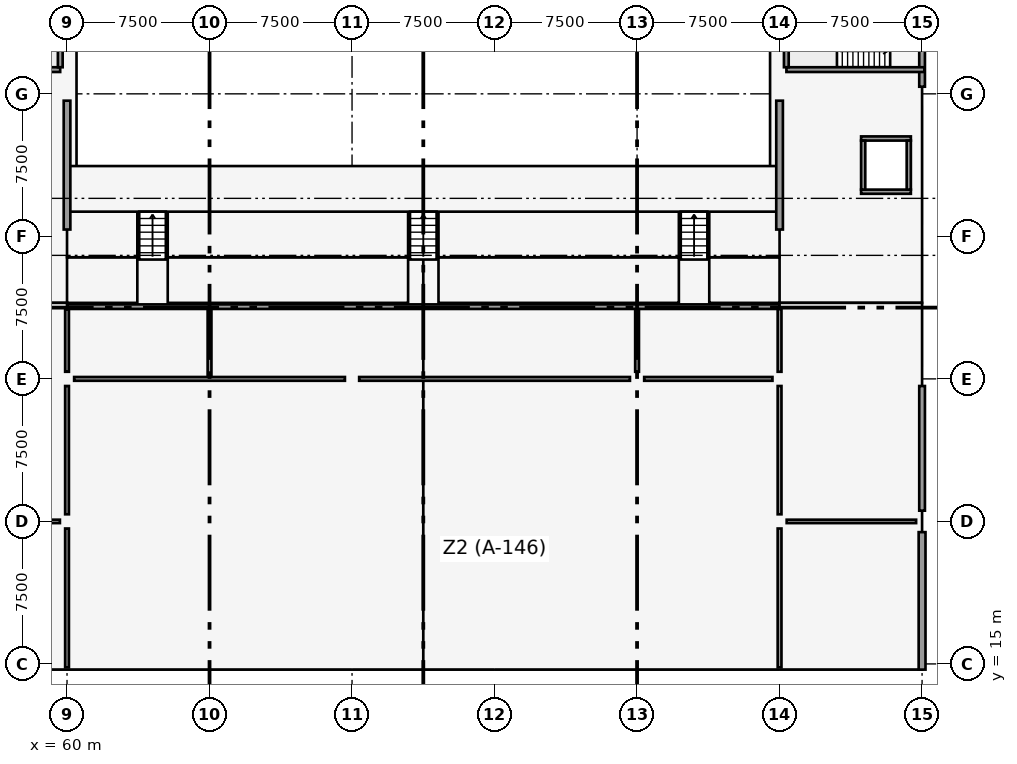
"""IFC4 building model, lengths in metres.
Left out: names, types, materials, properties, quantities, classifications, styles, units other than length and angle.
Written with IfcOpenShell. Run it as: python <this file> out.ifc"""

import sys

from ifc_helpers import new_model, si_unit, direction, frame, frame_2d, origin, origin_2d, place, context, subcontext, project, spatial, rectangle, extrude, element, fill, save


model = new_model("IFC4")
c1 = context("Model", 3, precision=1e-05, world=origin(), true_north=direction((0.0, 1.0)))
c2 = subcontext(c1, "Body", "Model", "MODEL_VIEW")
j1 = project(units=[si_unit("LENGTHUNIT", "METRE"), si_unit("PLANEANGLEUNIT", "RADIAN")], contexts=[c1])
p1 = place(None, origin())
s1 = spatial("IfcSite", under=j1, at=p1, CompositionType="ELEMENT")
p2 = place(p1, origin())
s2 = spatial("IfcBuilding", under=s1, at=p2, CompositionType="ELEMENT")
p3 = place(p2, frame((0.0, 0.0, 13.2)))
s3 = spatial("IfcBuildingStorey", under=s2, at=p3, CompositionType="ELEMENT", Elevation=13.2)
for number, where, z_axis, x_axis in (
    (1, (60.0, 22.5, 0.0), (0.0, 0.0, 1.0), (1.0, 0.0, 0.0)),
    (2, (60.0, 30.0, 0.0), (0.0, 0.0, 1.0), (1.0, 0.0, 0.0)),
    (3, (60.0, 37.5, 0.0), (0.0, 0.0, 1.0), (1.0, 0.0, 0.0)),
    (4, (60.0, 45.0, 0.0), (0.0, 0.0, 1.0), (1.0, 0.0, 0.0)),
    (5, (75.0, 22.5, 0.0), (0.0, 0.0, 1.0), (1.0, 0.0, 0.0)),
    (6, (75.0, 30.0, 0.0), (0.0, 0.0, 1.0), (1.0, 0.0, 0.0)),
    (7, (90.0, 22.5, 0.0), (0.0, 0.0, 1.0), (1.0, 0.0, 0.0)),
    (8, (90.0, 30.0, 0.0), (0.0, 0.0, 1.0), (1.0, 0.0, 0.0)),
    (9, (97.5, 22.5, 0.0), (0.0, 0.0, 1.0), (1.0, 0.0, 0.0)),
    (10, (97.5, 30.0, 0.0), (0.0, 0.0, 1.0), (1.0, 0.0, 0.0)),
    (11, (97.5, 37.5, 0.0), (0.0, 0.0, 1.0), (1.0, 0.0, 0.0)),
    (12, (97.5, 45.0, 0.0), (0.0, 0.0, 1.0), (1.0, 0.0, 0.0)),
):
    element("IfcColumn", number, at=place(p3, frame(where, z_axis=z_axis, x_axis=x_axis)), inside=s3, PredefinedType="COLUMN", context=c2, shape_type="SweptSolid", body=[
        extrude(rectangle(XDim=0.72, YDim=0.72, at=origin_2d()), origin(), (0.0, 0.0, 1.0), 3.9),
    ])
p4 = place(p3, frame((105.0, 22.5, 0.0), z_axis=(0.0, 0.0, 1.0), x_axis=(1.0, 0.0, 0.0)))
e13 = element("IfcColumn", 13, at=p4, inside=s3, PredefinedType="COLUMN", context=c2, shape_type="SweptSolid", body=[
    extrude(rectangle(XDim=0.6, YDim=1.1, at=origin_2d()), origin(), (0.0, 0.0, 1.0), 3.9),
])
for number, where, z_axis, x_axis in (
    (14, (105.0, 30.0, 0.0), (0.0, 0.0, 1.0), (1.0, 0.0, 0.0)),
    (15, (105.0, 37.5, 0.0), (0.0, 0.0, 1.0), (1.0, 0.0, 0.0)),
    (16, (105.0, 45.0, 0.0), (0.0, 0.0, 1.0), (1.0, 0.0, 0.0)),
):
    element("IfcColumn", number, at=place(p3, frame(where, z_axis=z_axis, x_axis=x_axis)), inside=s3, PredefinedType="COLUMN", context=c2, shape_type="SweptSolid", body=[
        extrude(rectangle(XDim=0.72, YDim=0.72, at=origin_2d()), origin(), (0.0, 0.0, 1.0), 3.9),
    ])
for number, where, z_axis, x_axis in (
    (17, (60.0, 37.86, 0.0), (0.0, 0.0, 1.0), (0.0, 1.0, 0.0)),
    (18, (97.5, 37.86, 0.0), (0.0, 0.0, 1.0), (0.0, 1.0, 0.0)),
):
    element("IfcWall", number, at=place(p3, frame(where, z_axis=z_axis, x_axis=x_axis)), inside=s3, PredefinedType="SHEAR", context=c2, shape_type="SweptSolid", body=[
        extrude(rectangle(XDim=6.78, YDim=0.35, at=frame_2d((3.39, 0.0))), origin(), (0.0, 0.0, 1.0), 2.42),
    ])
p5 = place(p3, frame((105.0, 14.7, 0.0), z_axis=(0.0, 0.0, 1.0), x_axis=(0.0, 1.0, 0.0)))
e19 = element("IfcWall", 19, at=p5, inside=s3, PredefinedType="SOLIDWALL", context=c2, shape_type="SweptSolid", body=[
    extrude(rectangle(XDim=7.235, YDim=0.36, at=frame_2d((3.618, 0.0))), origin(), (0.0, 0.0, 1.0), 2.39),
])
p6 = place(p3, frame((105.0, 23.065, 0.0), z_axis=(0.0, 0.0, 1.0), x_axis=(0.0, 1.0, 0.0)))
e20 = element("IfcWall", 20, at=p6, inside=s3, PredefinedType="SOLIDWALL", context=c2, shape_type="SweptSolid", body=[
    extrude(rectangle(XDim=6.56, YDim=0.3, at=frame_2d((3.28, 0.0))), origin(), (0.0, 0.0, 1.0), 2.39),
])
p7 = place(p3, frame((105.0, 45.375, 0.0), z_axis=(0.0, 0.0, 1.0), x_axis=(0.0, 1.0, 0.0)))
e21 = element("IfcWall", 21, at=p7, inside=s3, PredefinedType="SOLIDWALL", context=c2, shape_type="SweptSolid", body=[
    extrude(rectangle(XDim=6.75, YDim=0.3, at=frame_2d((3.375, 0.0))), origin(), (0.0, 0.0, 1.0), 2.54),
])
p8 = place(p3, frame((52.38, 46.275, 0.0), z_axis=(0.0, 0.0, 1.0), x_axis=(1.0, 0.0, 0.0)))
e22 = element("IfcWall", 22, at=p8, inside=s3, PredefinedType="SOLIDWALL", context=c2, shape_type="SweptSolid", body=[
    extrude(rectangle(XDim=7.26, YDim=0.25, at=frame_2d((3.63, 0.0))), origin(), (0.0, 0.0, 1.0), 3.62),
])
p9 = place(p8, frame((0.62, 0.0, 0.0)))
e23 = element("IfcOpeningElement", 23, at=p9, cuts=e22, PredefinedType="OPENING", context=c2, shape_type="SweptSolid", body=[
    extrude(rectangle(XDim=1.1, YDim=2.15, at=frame_2d((0.55, 1.075))), frame((0.0, 0.135, 0.0), z_axis=(0.0, -1.0, 0.0), x_axis=(1.0, 0.0, 0.0)), (0.0, 0.0, 1.0), 0.27),
])
p10 = place(p3, frame((59.645, 46.4, 0.0), z_axis=(0.0, 0.0, 1.0), x_axis=(0.0, 1.0, 0.0)))
e24 = element("IfcWall", 24, at=p10, inside=s3, PredefinedType="SOLIDWALL", context=c2, shape_type="SweptSolid", body=[
    extrude(rectangle(XDim=3.56, YDim=0.25, at=frame_2d((1.78, 0.0))), origin(), (0.0, 0.0, 1.0), 3.62),
])
p11 = place(p3, frame((97.86, 46.275, 0.0), z_axis=(0.0, 0.0, 1.0), x_axis=(1.0, 0.0, 0.0)))
e25 = element("IfcWall", 25, at=p11, inside=s3, PredefinedType="SOLIDWALL", context=c2, shape_type="SweptSolid", body=[
    extrude(rectangle(XDim=7.26, YDim=0.25, at=frame_2d((3.63, 0.0))), origin(), (0.0, 0.0, 1.0), 3.62),
])
p12 = place(p11, frame((5.54, 0.0, 0.0)))
e26 = element("IfcOpeningElement", 26, at=p12, cuts=e25, PredefinedType="OPENING", context=c2, shape_type="SweptSolid", body=[
    extrude(rectangle(XDim=1.1, YDim=2.15, at=frame_2d((0.55, 1.075))), frame((0.0, 0.135, 0.0), z_axis=(0.0, -1.0, 0.0), x_axis=(1.0, 0.0, 0.0)), (0.0, 0.0, 1.0), 0.27),
])
p13 = place(p3, frame((97.855, 46.4, 0.0), z_axis=(0.0, 0.0, 1.0), x_axis=(0.0, 1.0, 0.0)))
e27 = element("IfcWall", 27, at=p13, inside=s3, PredefinedType="SOLIDWALL", context=c2, shape_type="SweptSolid", body=[
    extrude(rectangle(XDim=3.56, YDim=0.25, at=frame_2d((1.78, 0.0))), origin(), (0.0, 0.0, 1.0), 3.62),
])
for number, where, z_axis, x_axis in (
    (28, (101.79, 39.85, 0.0), (0.0, 0.0, 1.0), (1.0, 0.0, 0.0)),
    (29, (101.79, 42.65, 0.0), (0.0, 0.0, 1.0), (1.0, 0.0, 0.0)),
):
    element("IfcWall", number, at=place(p3, frame(where, z_axis=z_axis, x_axis=x_axis)), inside=s3, PredefinedType="SOLIDWALL", context=c2, shape_type="SweptSolid", body=[
        extrude(rectangle(XDim=2.62, YDim=0.22, at=frame_2d((1.31, 0.0))), origin(), (0.0, 0.0, 1.0), 3.62),
    ])
p14 = place(p3, frame((101.9, 39.96, 0.0), z_axis=(0.0, 0.0, 1.0), x_axis=(0.0, 1.0, 0.0)))
e30 = element("IfcWall", 30, at=p14, inside=s3, PredefinedType="SOLIDWALL", context=c2, shape_type="SweptSolid", body=[
    extrude(rectangle(XDim=2.58, YDim=0.22, at=frame_2d((1.29, 0.0))), origin(), (0.0, 0.0, 1.0), 3.62),
])
p15 = place(p14, frame((0.79, 0.0, 0.0)))
e31 = element("IfcOpeningElement", 31, at=p15, cuts=e30, PredefinedType="OPENING", context=c2, shape_type="SweptSolid", body=[
    extrude(rectangle(XDim=1.0, YDim=2.15, at=frame_2d((0.5, 1.075))), frame((0.0, 0.12, 0.0), z_axis=(0.0, -1.0, 0.0), x_axis=(1.0, 0.0, 0.0)), (0.0, 0.0, 1.0), 0.24),
])
p16 = place(p3, frame((104.3, 39.96, 0.0), z_axis=(0.0, 0.0, 1.0), x_axis=(0.0, 1.0, 0.0)))
e32 = element("IfcWall", 32, at=p16, inside=s3, PredefinedType="SOLIDWALL", context=c2, shape_type="SweptSolid", body=[
    extrude(rectangle(XDim=2.58, YDim=0.22, at=frame_2d((1.29, 0.0))), origin(), (0.0, 0.0, 1.0), 3.62),
])
p17 = place(p3, frame((52.814, 22.5, 0.0), z_axis=(0.0, 0.0, 1.0), x_axis=(1.0, 0.0, 0.0)))
e33 = element("IfcWall", 33, at=p17, inside=s3, PredefinedType="PARTITIONING", context=c2, shape_type="SweptSolid", body=[
    extrude(rectangle(XDim=6.812, YDim=0.18, at=frame_2d((3.406, 0.0))), origin(), (0.0, 0.0, 1.0), 2.39),
])
p18 = place(p17, frame((2.786, 0.0, 0.0)))
e34 = element("IfcOpeningElement", 34, at=p18, cuts=e33, PredefinedType="OPENING", context=c2, shape_type="SweptSolid", body=[
    extrude(rectangle(XDim=1.3, YDim=2.15, at=frame_2d((0.65, 1.075))), frame((0.0, 0.1, 0.0), z_axis=(0.0, -1.0, 0.0), x_axis=(1.0, 0.0, 0.0)), (0.0, 0.0, 1.0), 0.2),
])
p19 = place(p3, frame((97.874, 22.5, 0.0), z_axis=(0.0, 0.0, 1.0), x_axis=(1.0, 0.0, 0.0)))
e35 = element("IfcWall", 35, at=p19, inside=s3, PredefinedType="PARTITIONING", context=c2, shape_type="SweptSolid", body=[
    extrude(rectangle(XDim=6.812, YDim=0.18, at=frame_2d((3.406, 0.0))), origin(), (0.0, 0.0, 1.0), 2.39),
])
p20 = place(p19, frame((2.726, 0.0, 0.0)))
e36 = element("IfcOpeningElement", 36, at=p20, cuts=e35, PredefinedType="OPENING", context=c2, shape_type="SweptSolid", body=[
    extrude(rectangle(XDim=1.3, YDim=2.15, at=frame_2d((0.65, 1.075))), frame((0.0, 0.1, 0.0), z_axis=(0.0, -1.0, 0.0), x_axis=(1.0, 0.0, 0.0)), (0.0, 0.0, 1.0), 0.2),
])
p21 = place(p3, frame((60.374, 30.0, 0.0), z_axis=(0.0, 0.0, 1.0), x_axis=(1.0, 0.0, 0.0)))
e37 = element("IfcWall", 37, at=p21, inside=s3, PredefinedType="PARTITIONING", context=c2, shape_type="SweptSolid", body=[
    extrude(rectangle(XDim=14.252, YDim=0.2, at=frame_2d((7.126, 0.0))), origin(), (0.0, 0.0, 1.0), 2.39),
])
p22 = place(p21, frame((2.626, 0.0, 0.0)))
e38 = element("IfcOpeningElement", 38, at=p22, cuts=e37, PredefinedType="OPENING", context=c2, shape_type="SweptSolid", body=[
    extrude(rectangle(XDim=1.5, YDim=2.16, at=frame_2d((0.75, 1.08))), frame((0.0, 0.11, 0.0), z_axis=(0.0, -1.0, 0.0), x_axis=(1.0, 0.0, 0.0)), (0.0, 0.0, 1.0), 0.22),
])
p23 = place(p3, frame((75.374, 30.0, 0.0), z_axis=(0.0, 0.0, 1.0), x_axis=(1.0, 0.0, 0.0)))
e39 = element("IfcWall", 39, at=p23, inside=s3, PredefinedType="PARTITIONING", context=c2, shape_type="SweptSolid", body=[
    extrude(rectangle(XDim=14.252, YDim=0.2, at=frame_2d((7.126, 0.0))), origin(), (0.0, 0.0, 1.0), 2.59),
])
p24 = place(p3, frame((90.374, 30.0, 0.0), z_axis=(0.0, 0.0, 1.0), x_axis=(1.0, 0.0, 0.0)))
e40 = element("IfcWall", 40, at=p24, inside=s3, PredefinedType="PARTITIONING", context=c2, shape_type="SweptSolid", body=[
    extrude(rectangle(XDim=6.752, YDim=0.2, at=frame_2d((3.376, 0.0))), origin(), (0.0, 0.0, 1.0), 2.39),
])
p25 = place(p24, frame((2.626, 0.0, 0.0)))
e41 = element("IfcOpeningElement", 41, at=p25, cuts=e40, PredefinedType="OPENING", context=c2, shape_type="SweptSolid", body=[
    extrude(rectangle(XDim=1.5, YDim=2.16, at=frame_2d((0.75, 1.08))), frame((0.0, 0.11, 0.0), z_axis=(0.0, -1.0, 0.0), x_axis=(1.0, 0.0, 0.0)), (0.0, 0.0, 1.0), 0.22),
])
p26 = place(p3, frame((60.0, 33.8, 0.0), z_axis=(0.0, 0.0, 1.0), x_axis=(1.0, 0.0, 0.0)))
e42 = element("IfcWall", 42, at=p26, inside=s3, PredefinedType="PARTITIONING", context=c2, shape_type="SweptSolid", body=[
    extrude(rectangle(XDim=37.5, YDim=0.24, at=frame_2d((18.75, 0.0))), origin(), (0.0, 0.0, 1.0), 2.39),
])
p27 = place(p26, frame((2.95, 0.0, 0.0)))
e43 = element("IfcOpeningElement", 43, at=p27, cuts=e42, PredefinedType="OPENING", context=c2, shape_type="SweptSolid", body=[
    extrude(rectangle(XDim=1.6, YDim=2.16, at=frame_2d((0.8, 1.08))), frame((0.0, 0.13, 0.0), z_axis=(0.0, -1.0, 0.0), x_axis=(1.0, 0.0, 0.0)), (0.0, 0.0, 1.0), 0.26),
])
p28 = place(p26, frame((32.95, 0.0, 0.0)))
e44 = element("IfcOpeningElement", 44, at=p28, cuts=e42, PredefinedType="OPENING", context=c2, shape_type="SweptSolid", body=[
    extrude(rectangle(XDim=1.6, YDim=2.16, at=frame_2d((0.8, 1.08))), frame((0.0, 0.13, 0.0), z_axis=(0.0, -1.0, 0.0), x_axis=(1.0, 0.0, 0.0)), (0.0, 0.0, 1.0), 0.26),
])
p29 = place(p3, frame((67.5, 30.114, 0.0), z_axis=(0.0, 0.0, 1.0), x_axis=(0.0, 1.0, 0.0)))
e45 = element("IfcWall", 45, at=p29, inside=s3, PredefinedType="PARTITIONING", context=c2, shape_type="SweptSolid", body=[
    extrude(rectangle(XDim=3.552, YDim=0.2, at=frame_2d((1.776, 0.0))), origin(), (0.0, 0.0, 1.0), 2.59),
])
p30 = place(p3, frame((90.0, 30.374, 0.0), z_axis=(0.0, 0.0, 1.0), x_axis=(0.0, 1.0, 0.0)))
e46 = element("IfcWall", 46, at=p30, inside=s3, PredefinedType="PARTITIONING", context=c2, shape_type="SweptSolid", body=[
    extrude(rectangle(XDim=3.292, YDim=0.2, at=frame_2d((1.646, 0.0))), origin(), (0.0, 0.0, 1.0), 2.59),
])
p31 = place(p3, frame((60.0, 14.82, 0.0), z_axis=(0.0, 0.0, 1.0), x_axis=(0.0, 1.0, 0.0)))
e47 = element("IfcWall", 47, at=p31, inside=s3, PredefinedType="PARTITIONING", context=c2, shape_type="SweptSolid", body=[
    extrude(rectangle(XDim=7.306, YDim=0.2, at=frame_2d((3.653, 0.0))), origin(), (0.0, 0.0, 1.0), 2.39),
])
p32 = place(p3, frame((60.0, 22.874, 0.0), z_axis=(0.0, 0.0, 1.0), x_axis=(0.0, 1.0, 0.0)))
e48 = element("IfcWall", 48, at=p32, inside=s3, PredefinedType="PARTITIONING", context=c2, shape_type="SweptSolid", body=[
    extrude(rectangle(XDim=6.752, YDim=0.2, at=frame_2d((3.376, 0.0))), origin(), (0.0, 0.0, 1.0), 2.39),
])
p33 = place(p32, frame((2.576, 0.0, 0.0)))
e49 = element("IfcOpeningElement", 49, at=p33, cuts=e48, PredefinedType="OPENING", context=c2, shape_type="SweptSolid", body=[
    extrude(rectangle(XDim=1.6, YDim=2.15, at=frame_2d((0.8, 1.075))), frame((0.0, 0.11, 0.0), z_axis=(0.0, -1.0, 0.0), x_axis=(1.0, 0.0, 0.0)), (0.0, 0.0, 1.0), 0.22),
])
p34 = place(p3, frame((60.0, 30.374, 0.0), z_axis=(0.0, 0.0, 1.0), x_axis=(0.0, 1.0, 0.0)))
e50 = element("IfcWall", 50, at=p34, inside=s3, PredefinedType="PARTITIONING", context=c2, shape_type="SweptSolid", body=[
    extrude(rectangle(XDim=3.292, YDim=0.2, at=frame_2d((1.646, 0.0))), origin(), (0.0, 0.0, 1.0), 2.39),
])
p35 = place(p34, frame((0.726, 0.0, 0.0)))
e51 = element("IfcOpeningElement", 51, at=p35, cuts=e50, PredefinedType="OPENING", context=c2, shape_type="SweptSolid", body=[
    extrude(rectangle(XDim=1.6, YDim=2.16, at=frame_2d((0.8, 1.08))), frame((0.0, 0.11, 0.0), z_axis=(0.0, -1.0, 0.0), x_axis=(1.0, 0.0, 0.0)), (0.0, 0.0, 1.0), 0.22),
])
p36 = place(p3, frame((97.5, 14.82, 0.0), z_axis=(0.0, 0.0, 1.0), x_axis=(0.0, 1.0, 0.0)))
e52 = element("IfcWall", 52, at=p36, inside=s3, PredefinedType="PARTITIONING", context=c2, shape_type="SweptSolid", body=[
    extrude(rectangle(XDim=7.306, YDim=0.2, at=frame_2d((3.653, 0.0))), origin(), (0.0, 0.0, 1.0), 2.39),
])
p37 = place(p3, frame((97.5, 22.874, 0.0), z_axis=(0.0, 0.0, 1.0), x_axis=(0.0, 1.0, 0.0)))
e53 = element("IfcWall", 53, at=p37, inside=s3, PredefinedType="PARTITIONING", context=c2, shape_type="SweptSolid", body=[
    extrude(rectangle(XDim=6.752, YDim=0.2, at=frame_2d((3.376, 0.0))), origin(), (0.0, 0.0, 1.0), 2.39),
])
p38 = place(p37, frame((2.576, 0.0, 0.0)))
e54 = element("IfcOpeningElement", 54, at=p38, cuts=e53, PredefinedType="OPENING", context=c2, shape_type="SweptSolid", body=[
    extrude(rectangle(XDim=1.6, YDim=2.15, at=frame_2d((0.8, 1.075))), frame((0.0, 0.11, 0.0), z_axis=(0.0, -1.0, 0.0), x_axis=(1.0, 0.0, 0.0)), (0.0, 0.0, 1.0), 0.22),
])
p39 = place(p3, frame((97.5, 30.374, 0.0), z_axis=(0.0, 0.0, 1.0), x_axis=(0.0, 1.0, 0.0)))
e55 = element("IfcWall", 55, at=p39, inside=s3, PredefinedType="PARTITIONING", context=c2, shape_type="SweptSolid", body=[
    extrude(rectangle(XDim=3.292, YDim=0.2, at=frame_2d((1.646, 0.0))), origin(), (0.0, 0.0, 1.0), 2.39),
])
p40 = place(p39, frame((0.726, 0.0, 0.0)))
e56 = element("IfcOpeningElement", 56, at=p40, cuts=e55, PredefinedType="OPENING", context=c2, shape_type="SweptSolid", body=[
    extrude(rectangle(XDim=1.6, YDim=2.16, at=frame_2d((0.8, 1.08))), frame((0.0, 0.11, 0.0), z_axis=(0.0, -1.0, 0.0), x_axis=(1.0, 0.0, 0.0)), (0.0, 0.0, 1.0), 0.22),
])
p41 = place(p12, origin())
e57 = element("IfcDoor", 57, at=p41, inside=s3, OperationType="SINGLE_SWING_LEFT", PredefinedType="DOOR", context=c2, shape_type="SweptSolid", body=[
    extrude(rectangle(XDim=1.1, YDim=2.15, at=frame_2d((0.55, 1.075))), frame((0.0, 0.025, 0.0), z_axis=(0.0, -1.0, 0.0), x_axis=(1.0, 0.0, 0.0)), (0.0, 0.0, 1.0), 0.05),
])
fill(e26, e57)
p42 = place(p15, origin())
e58 = element("IfcDoor", 58, at=p42, inside=s3, OperationType="SLIDING_TO_LEFT", PredefinedType="DOOR", context=c2, shape_type="SweptSolid", body=[
    extrude(rectangle(XDim=1.0, YDim=2.15, at=frame_2d((0.5, 1.075))), frame((0.0, 0.025, 0.0), z_axis=(0.0, -1.0, 0.0), x_axis=(1.0, 0.0, 0.0)), (0.0, 0.0, 1.0), 0.05),
])
fill(e31, e58)
p43 = place(p20, origin())
e59 = element("IfcDoor", 59, at=p43, inside=s3, OperationType="SINGLE_SWING_LEFT", PredefinedType="DOOR", context=c2, shape_type="SweptSolid", body=[
    extrude(rectangle(XDim=1.3, YDim=2.15, at=frame_2d((0.65, 1.075))), frame((0.0, 0.025, 0.0), z_axis=(0.0, -1.0, 0.0), x_axis=(1.0, 0.0, 0.0)), (0.0, 0.0, 1.0), 0.05),
])
fill(e36, e59)
p44 = place(p22, origin())
e60 = element("IfcDoor", 60, at=p44, inside=s3, OperationType="SINGLE_SWING_RIGHT", PredefinedType="DOOR", context=c2, shape_type="SweptSolid", body=[
    extrude(rectangle(XDim=1.5, YDim=2.16, at=frame_2d((0.75, 1.08))), frame((0.0, 0.025, 0.0), z_axis=(0.0, -1.0, 0.0), x_axis=(1.0, 0.0, 0.0)), (0.0, 0.0, 1.0), 0.05),
])
fill(e38, e60)
p45 = place(p25, origin())
e61 = element("IfcDoor", 61, at=p45, inside=s3, OperationType="SINGLE_SWING_LEFT", PredefinedType="DOOR", context=c2, shape_type="SweptSolid", body=[
    extrude(rectangle(XDim=1.5, YDim=2.16, at=frame_2d((0.75, 1.08))), frame((0.0, 0.025, 0.0), z_axis=(0.0, -1.0, 0.0), x_axis=(1.0, 0.0, 0.0)), (0.0, 0.0, 1.0), 0.05),
])
fill(e41, e61)
p46 = place(p27, origin())
e62 = element("IfcDoor", 62, at=p46, inside=s3, OperationType="SINGLE_SWING_RIGHT", PredefinedType="DOOR", context=c2, shape_type="SweptSolid", body=[
    extrude(rectangle(XDim=1.6, YDim=2.16, at=frame_2d((0.8, 1.08))), frame((0.0, 0.025, 0.0), z_axis=(0.0, -1.0, 0.0), x_axis=(1.0, 0.0, 0.0)), (0.0, 0.0, 1.0), 0.05),
])
fill(e43, e62)
p47 = place(p28, origin())
e63 = element("IfcDoor", 63, at=p47, inside=s3, OperationType="SINGLE_SWING_LEFT", PredefinedType="DOOR", context=c2, shape_type="SweptSolid", body=[
    extrude(rectangle(XDim=1.6, YDim=2.16, at=frame_2d((0.8, 1.08))), frame((0.0, 0.025, 0.0), z_axis=(0.0, -1.0, 0.0), x_axis=(1.0, 0.0, 0.0)), (0.0, 0.0, 1.0), 0.05),
])
fill(e44, e63)
p48 = place(p33, origin())
e64 = element("IfcDoor", 64, at=p48, inside=s3, OperationType="SINGLE_SWING_RIGHT", PredefinedType="DOOR", context=c2, shape_type="SweptSolid", body=[
    extrude(rectangle(XDim=1.6, YDim=2.15, at=frame_2d((0.8, 1.075))), frame((0.0, 0.025, 0.0), z_axis=(0.0, -1.0, 0.0), x_axis=(1.0, 0.0, 0.0)), (0.0, 0.0, 1.0), 0.05),
])
fill(e49, e64)
p49 = place(p35, origin())
e65 = element("IfcDoor", 65, at=p49, inside=s3, OperationType="SINGLE_SWING_LEFT", PredefinedType="DOOR", context=c2, shape_type="SweptSolid", body=[
    extrude(rectangle(XDim=1.6, YDim=2.16, at=frame_2d((0.8, 1.08))), frame((0.0, 0.025, 0.0), z_axis=(0.0, -1.0, 0.0), x_axis=(1.0, 0.0, 0.0)), (0.0, 0.0, 1.0), 0.05),
])
fill(e51, e65)
p50 = place(p38, origin())
e66 = element("IfcDoor", 66, at=p50, inside=s3, OperationType="SINGLE_SWING_RIGHT", PredefinedType="DOOR", context=c2, shape_type="SweptSolid", body=[
    extrude(rectangle(XDim=1.6, YDim=2.15, at=frame_2d((0.8, 1.075))), frame((0.0, 0.025, 0.0), z_axis=(0.0, -1.0, 0.0), x_axis=(1.0, 0.0, 0.0)), (0.0, 0.0, 1.0), 0.05),
])
fill(e54, e66)
p51 = place(p40, origin())
e67 = element("IfcDoor", 67, at=p51, inside=s3, OperationType="SINGLE_SWING_LEFT", PredefinedType="DOOR", context=c2, shape_type="SweptSolid", body=[
    extrude(rectangle(XDim=1.6, YDim=2.16, at=frame_2d((0.8, 1.08))), frame((0.0, 0.025, 0.0), z_axis=(0.0, -1.0, 0.0), x_axis=(1.0, 0.0, 0.0)), (0.0, 0.0, 1.0), 0.05),
])
fill(e56, e67)
save(model, sys.argv[1])
